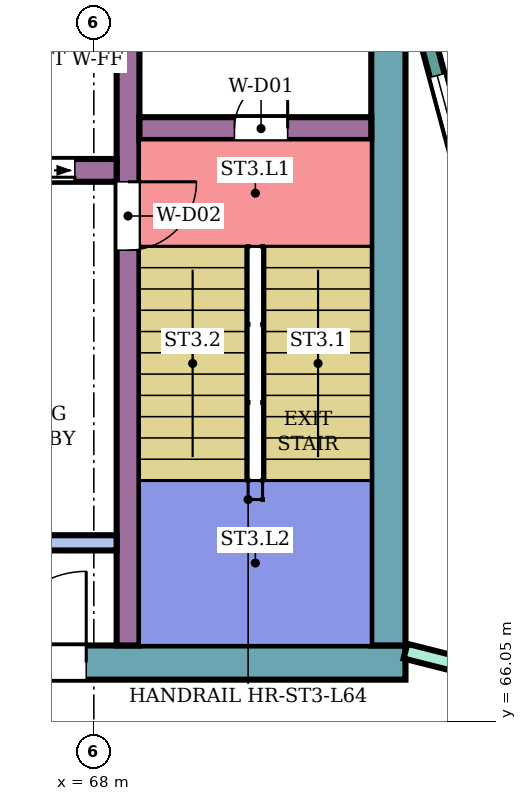
"""IFC4 building model, lengths in metres.
Left out: names, types, materials, properties, quantities, classifications, styles, units other than length and angle.
Written with IfcOpenShell. Run it as: python <this file> out.ifc"""

import sys

from ifc_helpers import new_model, si_unit, direction, frame, frame_2d, origin, place, context, subcontext, project, spatial, rectangle, extrude, element, fill, save


model = new_model("IFC4")
c1 = context("Model", 3, precision=1e-05, world=origin(), true_north=direction((0.0, 1.0)))
c2 = subcontext(c1, "Body", "Model", "MODEL_VIEW")
j1 = project(units=[si_unit("LENGTHUNIT", "METRE"), si_unit("PLANEANGLEUNIT", "RADIAN")], contexts=[c1])
p1 = place(None, origin())
s1 = spatial("IfcSite", under=j1, at=p1, CompositionType="ELEMENT")
p2 = place(p1, origin())
s2 = spatial("IfcBuilding", under=s1, at=p2, CompositionType="ELEMENT")
p3 = place(p2, frame((0.0, 0.0, 279.9)))
s3 = spatial("IfcBuildingStorey", under=s2, at=p3, CompositionType="ELEMENT", Elevation=279.9)
p4 = place(p3, frame((72.1, 66.825, 0.0), z_axis=(0.0, 0.0, 1.0), x_axis=(-1.0, 0.0, 0.0)))
e1 = element("IfcWall", 1, at=p4, inside=s3, PredefinedType="SHEAR", context=c2, shape_type="SweptSolid", body=[
    extrude(rectangle(XDim=13.55, YDim=0.45, at=frame_2d((6.775, 0.0))), origin(), (0.0, 0.0, 1.0), 3.88),
])
p5 = place(p4, frame((4.2, 0.0, 0.0)))
e2 = element("IfcOpeningElement", 2, at=p5, cuts=e1, PredefinedType="OPENING", context=c2, shape_type="SweptSolid", body=[
    extrude(rectangle(XDim=2.4, YDim=2.4, at=frame_2d((1.2, 1.2))), frame((0.0, 0.235, 0.0), z_axis=(0.0, -1.0, 0.0), x_axis=(1.0, 0.0, 0.0)), (0.0, 0.0, 1.0), 0.47),
])
p6 = place(p3, frame((71.875, 75.0, 0.0), z_axis=(0.0, 0.0, 1.0), x_axis=(0.0, -1.0, 0.0)))
e3 = element("IfcWall", 3, at=p6, inside=s3, PredefinedType="SHEAR", context=c2, shape_type="SweptSolid", body=[
    extrude(rectangle(XDim=7.95, YDim=0.45, at=frame_2d((3.975, 0.0))), origin(), (0.0, 0.0, 1.0), 3.88),
])
p7 = place(p3, frame((68.45, 75.0, 0.0), z_axis=(0.0, 0.0, 1.0), x_axis=(0.0, -1.0, 0.0)))
e4 = element("IfcWall", 4, at=p7, inside=s3, PredefinedType="SHEAR", context=c2, shape_type="SweptSolid", body=[
    extrude(rectangle(XDim=7.95, YDim=0.3, at=frame_2d((3.975, 0.0))), origin(), (0.0, 0.0, 1.0), 3.88),
])
p8 = place(p7, frame((1.85, 0.0, 0.0)))
e5 = element("IfcOpeningElement", 5, at=p8, cuts=e4, PredefinedType="OPENING", context=c2, shape_type="SweptSolid", body=[
    extrude(rectangle(XDim=0.9, YDim=2.1, at=frame_2d((0.45, 1.05))), frame((0.0, 0.16, 0.0), z_axis=(0.0, -1.0, 0.0), x_axis=(1.0, 0.0, 0.0)), (0.0, 0.0, 1.0), 0.32),
])
p9 = place(p3, frame((71.65, 73.85, 0.0), z_axis=(0.0, 0.0, 1.0), x_axis=(-1.0, 0.0, 0.0)))
e6 = element("IfcWall", 6, at=p9, inside=s3, PredefinedType="SHEAR", context=c2, shape_type="SweptSolid", body=[
    extrude(rectangle(XDim=3.05, YDim=0.3, at=frame_2d((1.525, 0.0))), origin(), (0.0, 0.0, 1.0), 3.88),
])
p10 = place(p9, frame((1.1, 0.0, 0.0)))
e7 = element("IfcOpeningElement", 7, at=p10, cuts=e6, PredefinedType="OPENING", context=c2, shape_type="SweptSolid", body=[
    extrude(rectangle(XDim=0.7, YDim=2.0, at=frame_2d((0.35, 1.0))), frame((0.0, 0.16, 0.0), z_axis=(0.0, -1.0, 0.0), x_axis=(1.0, 0.0, 0.0)), (0.0, 0.0, 1.0), 0.32),
])
p11 = place(p3, frame((68.3, 73.3, 0.0), z_axis=(0.0, 0.0, 1.0), x_axis=(-1.0, 0.0, 0.0)))
e8 = element("IfcWall", 8, at=p11, inside=s3, PredefinedType="SHEAR", context=c2, shape_type="SweptSolid", body=[
    extrude(rectangle(XDim=9.75, YDim=0.3, at=frame_2d((4.875, 0.0))), origin(), (0.0, 0.0, 1.0), 3.88),
])
p12 = place(p11, frame((0.55, 0.0, 0.0)))
e9 = element("IfcOpeningElement", 9, at=p12, cuts=e8, PredefinedType="OPENING", context=c2, shape_type="SweptSolid", body=[
    extrude(rectangle(XDim=1.1, YDim=2.1, at=frame_2d((0.55, 1.05))), frame((0.0, 0.16, 0.0), z_axis=(0.0, -1.0, 0.0), x_axis=(1.0, 0.0, 0.0)), (0.0, 0.0, 1.0), 0.32),
])
p13 = place(p11, frame((3.0, 0.0, 0.0)))
e10 = element("IfcOpeningElement", 10, at=p13, cuts=e8, PredefinedType="OPENING", context=c2, shape_type="SweptSolid", body=[
    extrude(rectangle(XDim=1.2, YDim=2.1, at=frame_2d((0.6, 1.05))), frame((0.0, 0.16, 0.0), z_axis=(0.0, -1.0, 0.0), x_axis=(1.0, 0.0, 0.0)), (0.0, 0.0, 1.0), 0.32),
])
p14 = place(p11, frame((5.5, 0.0, 0.0)))
e11 = element("IfcOpeningElement", 11, at=p14, cuts=e8, PredefinedType="OPENING", context=c2, shape_type="SweptSolid", body=[
    extrude(rectangle(XDim=1.2, YDim=2.1, at=frame_2d((0.6, 1.05))), frame((0.0, 0.16, 0.0), z_axis=(0.0, -1.0, 0.0), x_axis=(1.0, 0.0, 0.0)), (0.0, 0.0, 1.0), 0.32),
])
p15 = place(p11, frame((8.175, 0.0, 0.0)))
e12 = element("IfcOpeningElement", 12, at=p15, cuts=e8, PredefinedType="OPENING", context=c2, shape_type="SweptSolid", body=[
    extrude(rectangle(XDim=0.9, YDim=2.1, at=frame_2d((0.45, 1.05))), frame((0.0, 0.16, 0.0), z_axis=(0.0, -1.0, 0.0), x_axis=(1.0, 0.0, 0.0)), (0.0, 0.0, 1.0), 0.32),
])
p16 = place(p3, frame((68.3, 68.4, 0.0), z_axis=(0.0, 0.0, 1.0), x_axis=(-1.0, 0.0, 0.0)))
e13 = element("IfcWall", 13, at=p16, inside=s3, PredefinedType="SHEAR", context=c2, shape_type="SweptSolid", body=[
    extrude(rectangle(XDim=4.15, YDim=0.2, at=frame_2d((2.075, 0.0))), origin(), (0.0, 0.0, 1.0), 3.88),
])
p17 = place(p3, frame((72.396, 75.0, 0.0), z_axis=(0.0, 0.0, 1.0), x_axis=(0.258789828301, -0.965933654434, 0.0)))
e14 = element("IfcWall", 14, at=p17, inside=s3, PredefinedType="NOTDEFINED", context=c2, shape_type="SweptSolid", body=[
    extrude(rectangle(XDim=3.936, YDim=0.2, at=frame_2d((1.968, 0.0))), origin(), (0.0, 0.0, 1.0), 4.2),
])
p18 = place(p17, frame((0.468, 0.0, 0.9)))
e15 = element("IfcOpeningElement", 15, at=p18, cuts=e14, PredefinedType="OPENING", context=c2, shape_type="SweptSolid", body=[
    extrude(rectangle(XDim=3.0, YDim=2.3, at=frame_2d((1.5, 1.15))), frame((0.0, 0.11, 0.0), z_axis=(0.0, -1.0, 0.0), x_axis=(1.0, 0.0, 0.0)), (0.0, 0.0, 1.0), 0.22),
])
p19 = place(p3, frame((72.1, 66.975, 0.0), z_axis=(0.0, 0.0, 1.0), x_axis=(0.969471314457, -0.245204752086, 0.0)))
e16 = element("IfcWall", 16, at=p19, inside=s3, PredefinedType="PARTITIONING", context=c2, shape_type="SweptSolid", body=[
    extrude(rectangle(XDim=2.582, YDim=0.2, at=frame_2d((1.291, 0.0))), origin(), (0.0, 0.0, 1.0), 3.75),
])
p20 = place(p19, frame((0.841, 0.0, 0.0)))
e17 = element("IfcOpeningElement", 17, at=p20, cuts=e16, PredefinedType="OPENING", context=c2, shape_type="SweptSolid", body=[
    extrude(rectangle(XDim=0.9, YDim=2.1, at=frame_2d((0.45, 1.05))), frame((0.0, 0.11, 0.0), z_axis=(0.0, -1.0, 0.0), x_axis=(1.0, 0.0, 0.0)), (0.0, 0.0, 1.0), 0.22),
])
p21 = place(p18, origin())
e18 = element("IfcWindow", 18, at=p21, inside=s3, PartitioningType="SINGLE_PANEL", PredefinedType="WINDOW", context=c2, shape_type="SweptSolid", body=[
    extrude(rectangle(XDim=3.0, YDim=2.3, at=frame_2d((1.5, 1.15))), frame((0.0, 0.03, 0.0), z_axis=(0.0, -1.0, 0.0), x_axis=(1.0, 0.0, 0.0)), (0.0, 0.0, 1.0), 0.06),
])
fill(e15, e18)
p22 = place(p10, frame((0.7, 0.0, 0.0), z_axis=(0.0, 0.0, 1.0), x_axis=(-1.0, 0.0, 0.0)))
e19 = element("IfcDoor", 19, at=p22, inside=s3, OperationType="SINGLE_SWING_RIGHT", PredefinedType="DOOR", context=c2, shape_type="SweptSolid", body=[
    extrude(rectangle(XDim=0.7, YDim=2.0, at=frame_2d((0.35, 1.0))), frame((0.0, 0.025, 0.0), z_axis=(0.0, -1.0, 0.0), x_axis=(1.0, 0.0, 0.0)), (0.0, 0.0, 1.0), 0.05),
])
fill(e7, e19)
p23 = place(p8, origin())
e20 = element("IfcDoor", 20, at=p23, inside=s3, OperationType="SINGLE_SWING_LEFT", PredefinedType="DOOR", context=c2, shape_type="SweptSolid", body=[
    extrude(rectangle(XDim=0.9, YDim=2.1, at=frame_2d((0.45, 1.05))), frame((0.0, 0.025, 0.0), z_axis=(0.0, -1.0, 0.0), x_axis=(1.0, 0.0, 0.0)), (0.0, 0.0, 1.0), 0.05),
])
fill(e5, e20)
p24 = place(p12, origin())
e21 = element("IfcDoor", 21, at=p24, inside=s3, OperationType="DOUBLE_DOOR_SLIDING", PredefinedType="DOOR", context=c2, shape_type="SweptSolid", body=[
    extrude(rectangle(XDim=1.1, YDim=2.1, at=frame_2d((0.55, 1.05))), frame((0.0, 0.025, 0.0), z_axis=(0.0, -1.0, 0.0), x_axis=(1.0, 0.0, 0.0)), (0.0, 0.0, 1.0), 0.05),
])
fill(e9, e21)
p25 = place(p5, frame((2.4, 0.0, 0.0), z_axis=(0.0, 0.0, 1.0), x_axis=(-1.0, 0.0, 0.0)))
e22 = element("IfcDoor", 22, at=p25, inside=s3, OperationType="DOUBLE_DOOR_SINGLE_SWING", PredefinedType="DOOR", context=c2, shape_type="SweptSolid", body=[
    extrude(rectangle(XDim=2.4, YDim=2.4, at=frame_2d((1.2, 1.2))), frame((0.0, 0.025, 0.0), z_axis=(0.0, -1.0, 0.0), x_axis=(1.0, 0.0, 0.0)), (0.0, 0.0, 1.0), 0.05),
])
fill(e2, e22)
save(model, sys.argv[1])
